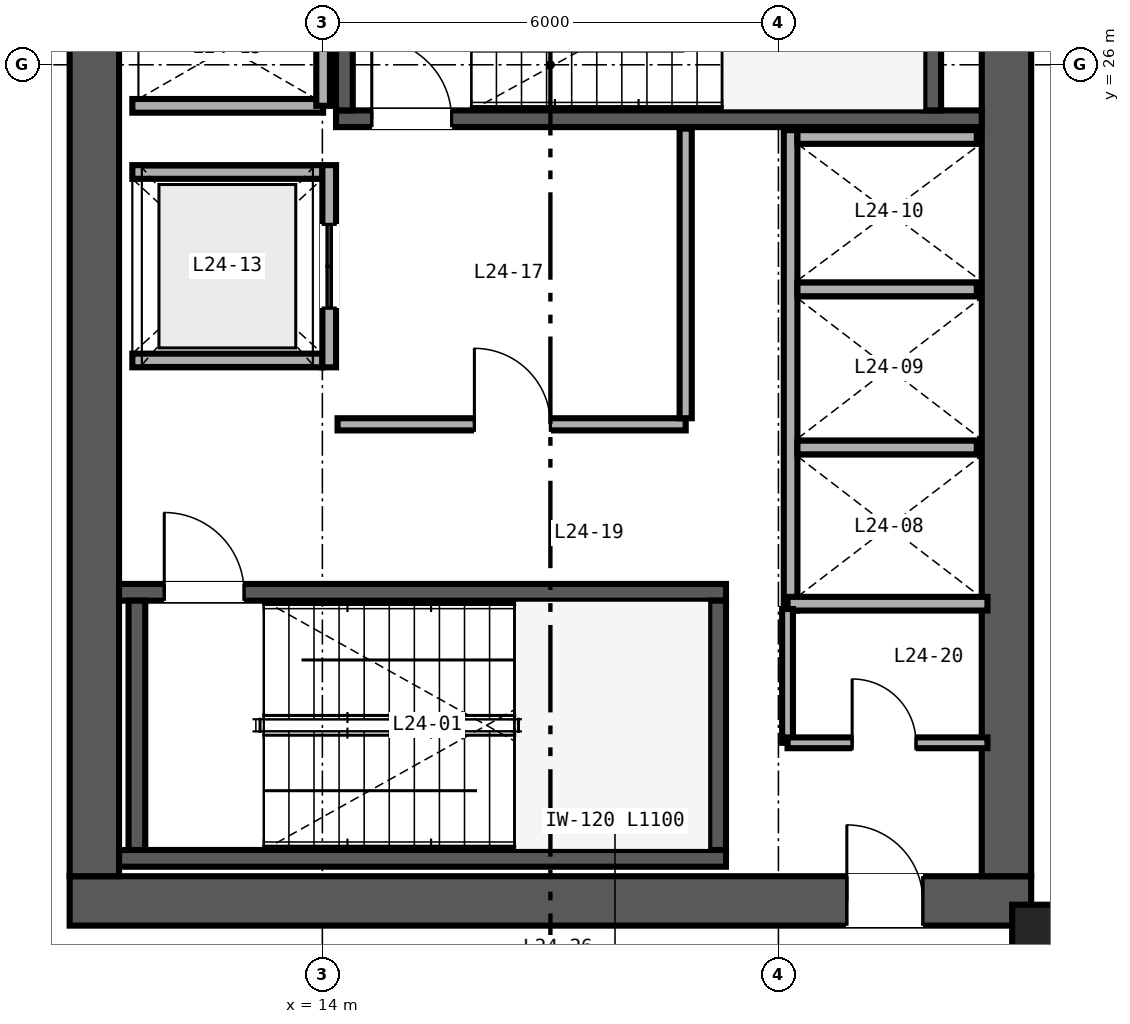
"""IFC4 building model, lengths in metres.
Left out: names, types, materials, properties, quantities, classifications, styles, units other than length and angle.
Written with IfcOpenShell. Run it as: python <this file> out.ifc"""

import sys

from ifc_helpers import new_model, si_unit, direction, frame, frame_2d, origin, origin_2d, place, context, subcontext, project, spatial, rectangle, hollow_rectangle, extrude, source, transform, mapped, element, fill, save


model = new_model("IFC4")
c1 = context("Model", 3, precision=1e-05, world=origin(), true_north=direction((0.0, 1.0)))
c2 = subcontext(c1, "Body", "Model", "MODEL_VIEW")
j1 = project(units=[si_unit("LENGTHUNIT", "METRE"), si_unit("PLANEANGLEUNIT", "RADIAN")], contexts=[c1])
p1 = place(None, origin())
s1 = spatial("IfcSite", under=j1, at=p1, CompositionType="ELEMENT")
p2 = place(p1, origin())
s2 = spatial("IfcBuilding", under=s1, at=p2, CompositionType="ELEMENT")
p3 = place(p2, frame((0.0, 0.0, 100.8)))
s3 = spatial("IfcBuildingStorey", under=s2, at=p3, CompositionType="ELEMENT", Elevation=100.8)
p4 = place(p3, frame((10.675, 15.0, 0.0), z_axis=(0.0, 0.0, 1.0), x_axis=(1.0, 0.0, 0.0)))
e1 = element("IfcWall", 1, at=p4, inside=s3, PredefinedType="SHEAR", context=c2, shape_type="SweptSolid", body=[
    extrude(rectangle(XDim=12.65, YDim=0.65, at=frame_2d((6.325, 0.0))), origin(), (0.0, 0.0, 1.0), 3.36),
])
p5 = place(p4, frame((10.225, 0.0, 0.0)))
e2 = element("IfcOpeningElement", 2, at=p5, cuts=e1, PredefinedType="OPENING", context=c2, shape_type="SweptSolid", body=[
    extrude(rectangle(XDim=1.0, YDim=2.15, at=frame_2d((0.5, 1.075))), frame((0.0, 0.335, 0.0), z_axis=(0.0, -1.0, 0.0), x_axis=(1.0, 0.0, 0.0)), (0.0, 0.0, 1.0), 0.67),
])
for number, where, z_axis, x_axis in (
    (3, (11.0, 15.325, 0.0), (0.0, 0.0, 1.0), (0.0, 1.0, 0.0)),
    (4, (23.0, 15.325, 0.0), (0.0, 0.0, 1.0), (0.0, 1.0, 0.0)),
):
    element("IfcWall", number, at=place(p3, frame(where, z_axis=z_axis, x_axis=x_axis)), inside=s3, PredefinedType="SHEAR", context=c2, shape_type="SweptSolid", body=[
        extrude(rectangle(XDim=21.35, YDim=0.65, at=frame_2d((10.675, 0.0))), origin(), (0.0, 0.0, 1.0), 3.36),
    ])
p6 = place(p3, frame((11.325, 15.56, 0.0), z_axis=(0.0, 0.0, 1.0), x_axis=(1.0, 0.0, 0.0)))
e5 = element("IfcWall", 5, at=p6, inside=s3, PredefinedType="SHEAR", context=c2, shape_type="SweptSolid", body=[
    extrude(rectangle(XDim=7.985, YDim=0.22, at=frame_2d((3.993, 0.0))), origin(), (0.0, 0.0, 1.0), 3.4),
])
p7 = place(p3, frame((11.325, 19.06, 0.0), z_axis=(0.0, 0.0, 1.0), x_axis=(1.0, 0.0, 0.0)))
e6 = element("IfcWall", 6, at=p7, inside=s3, PredefinedType="SHEAR", context=c2, shape_type="SweptSolid", body=[
    extrude(rectangle(XDim=7.985, YDim=0.22, at=frame_2d((3.993, 0.0))), origin(), (0.0, 0.0, 1.0), 3.4),
])
p8 = place(p7, frame((0.595, 0.0, 0.0)))
e7 = element("IfcOpeningElement", 7, at=p8, cuts=e6, PredefinedType="OPENING", context=c2, shape_type="SweptSolid", body=[
    extrude(rectangle(XDim=1.05, YDim=2.15, at=frame_2d((0.525, 1.075))), frame((0.0, 0.12, 0.0), z_axis=(0.0, -1.0, 0.0), x_axis=(1.0, 0.0, 0.0)), (0.0, 0.0, 1.0), 0.24),
])
for number, where, z_axis, x_axis in (
    (8, (11.56, 15.67, 0.0), (0.0, 0.0, 1.0), (0.0, 1.0, 0.0)),
    (9, (19.2, 15.67, 0.0), (0.0, 0.0, 1.0), (0.0, 1.0, 0.0)),
):
    element("IfcWall", number, at=place(p3, frame(where, z_axis=z_axis, x_axis=x_axis)), inside=s3, PredefinedType="SHEAR", context=c2, shape_type="SweptSolid", body=[
        extrude(rectangle(XDim=3.28, YDim=0.22, at=frame_2d((1.64, 0.0))), origin(), (0.0, 0.0, 1.0), 3.4),
    ])
p9 = place(p3, frame((14.18, 25.29, 0.0), z_axis=(0.0, 0.0, 1.0), x_axis=(1.0, 0.0, 0.0)))
e10 = element("IfcWall", 10, at=p9, inside=s3, PredefinedType="SHEAR", context=c2, shape_type="SweptSolid", body=[
    extrude(rectangle(XDim=8.495, YDim=0.22, at=frame_2d((4.248, 0.0))), origin(), (0.0, 0.0, 1.0), 3.4),
])
p10 = place(p9, frame((0.47, 0.0, 0.0)))
e11 = element("IfcOpeningElement", 11, at=p10, cuts=e10, PredefinedType="OPENING", context=c2, shape_type="SweptSolid", body=[
    extrude(rectangle(XDim=1.05, YDim=2.15, at=frame_2d((0.525, 1.075))), frame((0.0, 0.12, 0.0), z_axis=(0.0, -1.0, 0.0), x_axis=(1.0, 0.0, 0.0)), (0.0, 0.0, 1.0), 0.24),
])
for number, where, z_axis, x_axis in (
    (12, (14.29, 25.4, 0.0), (0.0, 0.0, 1.0), (0.0, 1.0, 0.0)),
    (13, (22.03, 25.4, 0.0), (0.0, 0.0, 1.0), (0.0, 1.0, 0.0)),
):
    element("IfcWall", number, at=place(p3, frame(where, z_axis=z_axis, x_axis=x_axis)), inside=s3, PredefinedType="SHEAR", context=c2, shape_type="SweptSolid", body=[
        extrude(rectangle(XDim=3.28, YDim=0.22, at=frame_2d((1.64, 0.0))), origin(), (0.0, 0.0, 1.0), 3.4),
    ])
m1 = source(origin(), c2, "Body", "SweptSolid", [
    extrude(hollow_rectangle(XDim=0.85, YDim=0.8, WallThickness=0.032, at=origin_2d()), origin(), (0.0, 0.0, 1.0), 3.36),
])
p11 = place(p3, frame((23.5, 14.55, 0.0), z_axis=(0.0, 0.0, 1.0), x_axis=(1.0, 0.0, 0.0)))
e14 = element("IfcColumn", 14, at=p11, inside=s3, PredefinedType="COLUMN", context=c2, shape_type="MappedRepresentation", body=[
    mapped(m1, transform((0.0, 0.0, 0.0), scale=1.0)),
])
p12 = place(p3, frame((20.16, 18.82, 0.0), z_axis=(0.0, 0.0, 1.0), x_axis=(0.0, 1.0, 0.0)))
e15 = element("IfcWall", 15, at=p12, inside=s3, PredefinedType="SOLIDWALL", context=c2, shape_type="SweptSolid", body=[
    extrude(rectangle(XDim=6.32, YDim=0.18, at=frame_2d((3.16, 0.0))), origin(), (0.0, 0.0, 1.0), 2.36),
])
p13 = place(p3, frame((20.12, 18.91, 0.0), z_axis=(0.0, 0.0, 1.0), x_axis=(1.0, 0.0, 0.0)))
e16 = element("IfcWall", 16, at=p13, inside=s3, PredefinedType="SOLIDWALL", context=c2, shape_type="SweptSolid", body=[
    extrude(rectangle(XDim=2.63, YDim=0.18, at=frame_2d((1.315, 0.0))), origin(), (0.0, 0.0, 1.0), 3.36),
])
p14 = place(p3, frame((20.25, 25.05, 0.0), z_axis=(0.0, 0.0, 1.0), x_axis=(1.0, 0.0, 0.0)))
e17 = element("IfcWall", 17, at=p14, inside=s3, PredefinedType="SOLIDWALL", context=c2, shape_type="SweptSolid", body=[
    extrude(rectangle(XDim=2.36, YDim=0.18, at=frame_2d((1.18, 0.0))), origin(), (0.0, 0.0, 1.0), 3.36),
])
p15 = place(p3, frame((20.25, 20.965, 0.0), z_axis=(0.0, 0.0, 1.0), x_axis=(1.0, 0.0, 0.0)))
e18 = element("IfcWall", 18, at=p15, inside=s3, PredefinedType="SOLIDWALL", context=c2, shape_type="SweptSolid", body=[
    extrude(rectangle(XDim=2.36, YDim=0.18, at=frame_2d((1.18, 0.0))), origin(), (0.0, 0.0, 1.0), 2.36),
])
p16 = place(p3, frame((20.25, 23.045, 0.0), z_axis=(0.0, 0.0, 1.0), x_axis=(1.0, 0.0, 0.0)))
e19 = element("IfcWall", 19, at=p16, inside=s3, PredefinedType="SOLIDWALL", context=c2, shape_type="SweptSolid", body=[
    extrude(rectangle(XDim=2.36, YDim=0.18, at=frame_2d((1.18, 0.0))), origin(), (0.0, 0.0, 1.0), 3.36),
])
for number, where, z_axis, x_axis in (
    (20, (11.5, 22.11, 0.0), (0.0, 0.0, 1.0), (1.0, 0.0, 0.0)),
    (21, (11.5, 24.59, 0.0), (0.0, 0.0, 1.0), (1.0, 0.0, 0.0)),
):
    element("IfcWall", number, at=place(p3, frame(where, z_axis=z_axis, x_axis=x_axis)), inside=s3, PredefinedType="SOLIDWALL", context=c2, shape_type="SweptSolid", body=[
        extrude(rectangle(XDim=2.5, YDim=0.18, at=frame_2d((1.25, 0.0))), origin(), (0.0, 0.0, 1.0), 3.36),
    ])
p17 = place(p3, frame((14.09, 22.02, 0.0), z_axis=(0.0, 0.0, 1.0), x_axis=(0.0, 1.0, 0.0)))
e22 = element("IfcWall", 22, at=p17, inside=s3, PredefinedType="SOLIDWALL", context=c2, shape_type="SweptSolid", body=[
    extrude(rectangle(XDim=2.66, YDim=0.18, at=frame_2d((1.33, 0.0))), origin(), (0.0, 0.0, 1.0), 3.36),
])
p18 = place(p17, frame((0.78, 0.0, 0.0)))
e23 = element("IfcOpeningElement", 23, at=p18, cuts=e22, PredefinedType="OPENING", context=c2, shape_type="SweptSolid", body=[
    extrude(rectangle(XDim=1.1, YDim=2.2, at=frame_2d((0.55, 1.1))), frame((0.0, 0.1, 0.0), z_axis=(0.0, -1.0, 0.0), x_axis=(1.0, 0.0, 0.0)), (0.0, 0.0, 1.0), 0.2),
])
p19 = place(p3, frame((11.5, 25.46, 0.0), z_axis=(0.0, 0.0, 1.0), x_axis=(1.0, 0.0, 0.0)))
e24 = element("IfcWall", 24, at=p19, inside=s3, PredefinedType="SOLIDWALL", context=c2, shape_type="SweptSolid", body=[
    extrude(rectangle(XDim=2.51, YDim=0.18, at=frame_2d((1.255, 0.0))), origin(), (0.0, 0.0, 1.0), 3.36),
])
p20 = place(p3, frame((14.01, 25.46, 0.0), z_axis=(0.0, 0.0, 1.0), x_axis=(0.0, 1.0, 0.0)))
e25 = element("IfcWall", 25, at=p20, inside=s3, PredefinedType="SOLIDWALL", context=c2, shape_type="SweptSolid", body=[
    extrude(rectangle(XDim=3.08, YDim=0.18, at=frame_2d((1.54, 0.0))), origin(), (0.0, 0.0, 1.0), 3.36),
])
p21 = place(p3, frame((14.2, 21.27, 0.0), z_axis=(0.0, 0.0, 1.0), x_axis=(1.0, 0.0, 0.0)))
e26 = element("IfcWall", 26, at=p21, inside=s3, PredefinedType="PARTITIONING", context=c2, shape_type="SweptSolid", body=[
    extrude(rectangle(XDim=4.58, YDim=0.16, at=frame_2d((2.29, 0.0))), origin(), (0.0, 0.0, 1.0), 3.36),
])
p22 = place(p21, frame((1.8, 0.0, 0.0)))
e27 = element("IfcOpeningElement", 27, at=p22, cuts=e26, PredefinedType="OPENING", context=c2, shape_type="SweptSolid", body=[
    extrude(rectangle(XDim=1.0, YDim=2.15, at=frame_2d((0.5, 1.075))), frame((0.0, 0.09, 0.0), z_axis=(0.0, -1.0, 0.0), x_axis=(1.0, 0.0, 0.0)), (0.0, 0.0, 1.0), 0.18),
])
p23 = place(p3, frame((18.78, 21.35, 0.0), z_axis=(0.0, 0.0, 1.0), x_axis=(0.0, 1.0, 0.0)))
e28 = element("IfcWall", 28, at=p23, inside=s3, PredefinedType="PARTITIONING", context=c2, shape_type="SweptSolid", body=[
    extrude(rectangle(XDim=3.81, YDim=0.16, at=frame_2d((1.905, 0.0))), origin(), (0.0, 0.0, 1.0), 3.36),
])
p24 = place(p3, frame((20.12, 17.08, 0.0), z_axis=(0.0, 0.0, 1.0), x_axis=(0.0, 1.0, 0.0)))
e29 = element("IfcWall", 29, at=p24, inside=s3, PredefinedType="PARTITIONING", context=c2, shape_type="SweptSolid", body=[
    extrude(rectangle(XDim=1.76, YDim=0.142, at=frame_2d((0.88, 0.0))), origin(), (0.0, 0.0, 1.0), 3.36),
])
p25 = place(p3, frame((20.12, 17.08, 0.0), z_axis=(0.0, 0.0, 1.0), x_axis=(1.0, 0.0, 0.0)))
e30 = element("IfcWall", 30, at=p25, inside=s3, PredefinedType="PARTITIONING", context=c2, shape_type="SweptSolid", body=[
    extrude(rectangle(XDim=2.63, YDim=0.142, at=frame_2d((1.315, 0.0))), origin(), (0.0, 0.0, 1.0), 3.36),
])
p26 = place(p25, frame((0.85, 0.0, 0.0)))
e31 = element("IfcOpeningElement", 31, at=p26, cuts=e30, PredefinedType="OPENING", context=c2, shape_type="SweptSolid", body=[
    extrude(rectangle(XDim=0.84, YDim=2.1, at=frame_2d((0.42, 1.05))), frame((0.0, 0.081, 0.0), z_axis=(0.0, -1.0, 0.0), x_axis=(1.0, 0.0, 0.0)), (0.0, 0.0, 1.0), 0.162),
])
m2 = source(origin(), c2, "Body", "SweptSolid", [
    extrude(rectangle(XDim=1.05, YDim=2.15, at=frame_2d((0.525, 1.075))), frame((0.0, 0.025, 0.0), z_axis=(0.0, -1.0, 0.0), x_axis=(1.0, 0.0, 0.0)), (0.0, 0.0, 1.0), 0.05),
])
p27 = place(p8, origin())
e32 = element("IfcDoor", 32, at=p27, inside=s3, OperationType="SINGLE_SWING_LEFT", PredefinedType="DOOR", context=c2, shape_type="MappedRepresentation", body=[
    mapped(m2, transform((0.0, 0.0, 0.0), scale=1.0)),
])
fill(e7, e32)
p28 = place(p10, origin())
e33 = element("IfcDoor", 33, at=p28, inside=s3, OperationType="SINGLE_SWING_LEFT", PredefinedType="DOOR", context=c2, shape_type="MappedRepresentation", body=[
    mapped(m2, transform((0.0, 0.0, 0.0), scale=1.0)),
])
fill(e11, e33)
m3 = source(origin(), c2, "Body", "SweptSolid", [
    extrude(rectangle(XDim=1.1, YDim=2.2, at=frame_2d((0.55, 1.1))), frame((0.0, 0.025, 0.0), z_axis=(0.0, -1.0, 0.0), x_axis=(1.0, 0.0, 0.0)), (0.0, 0.0, 1.0), 0.05),
])
p29 = place(p18, origin())
e34 = element("IfcDoor", 34, at=p29, inside=s3, OperationType="DOUBLE_DOOR_SLIDING", PredefinedType="DOOR", context=c2, shape_type="MappedRepresentation", body=[
    mapped(m3, transform((0.0, 0.0, 0.0), scale=1.0)),
])
fill(e23, e34)
m4 = source(origin(), c2, "Body", "SweptSolid", [
    extrude(rectangle(XDim=1.0, YDim=2.15, at=frame_2d((0.5, 1.075))), frame((0.0, 0.025, 0.0), z_axis=(0.0, -1.0, 0.0), x_axis=(1.0, 0.0, 0.0)), (0.0, 0.0, 1.0), 0.05),
])
p30 = place(p22, origin())
e35 = element("IfcDoor", 35, at=p30, inside=s3, OperationType="SINGLE_SWING_LEFT", PredefinedType="DOOR", context=c2, shape_type="MappedRepresentation", body=[
    mapped(m4, transform((0.0, 0.0, 0.0), scale=1.0)),
])
fill(e27, e35)
m5 = source(origin(), c2, "Body", "SweptSolid", [
    extrude(rectangle(XDim=0.84, YDim=2.1, at=frame_2d((0.42, 1.05))), frame((0.0, 0.025, 0.0), z_axis=(0.0, -1.0, 0.0), x_axis=(1.0, 0.0, 0.0)), (0.0, 0.0, 1.0), 0.05),
])
p31 = place(p26, origin())
e36 = element("IfcDoor", 36, at=p31, inside=s3, OperationType="SINGLE_SWING_LEFT", PredefinedType="DOOR", context=c2, shape_type="MappedRepresentation", body=[
    mapped(m5, transform((0.0, 0.0, 0.0), scale=1.0)),
])
fill(e31, e36)
p32 = place(p5, origin())
e37 = element("IfcDoor", 37, at=p32, inside=s3, OperationType="SINGLE_SWING_LEFT", PredefinedType="DOOR", context=c2, shape_type="MappedRepresentation", body=[
    mapped(m4, transform((0.0, 0.0, 0.0), scale=1.0)),
])
fill(e2, e37)
save(model, sys.argv[1])
